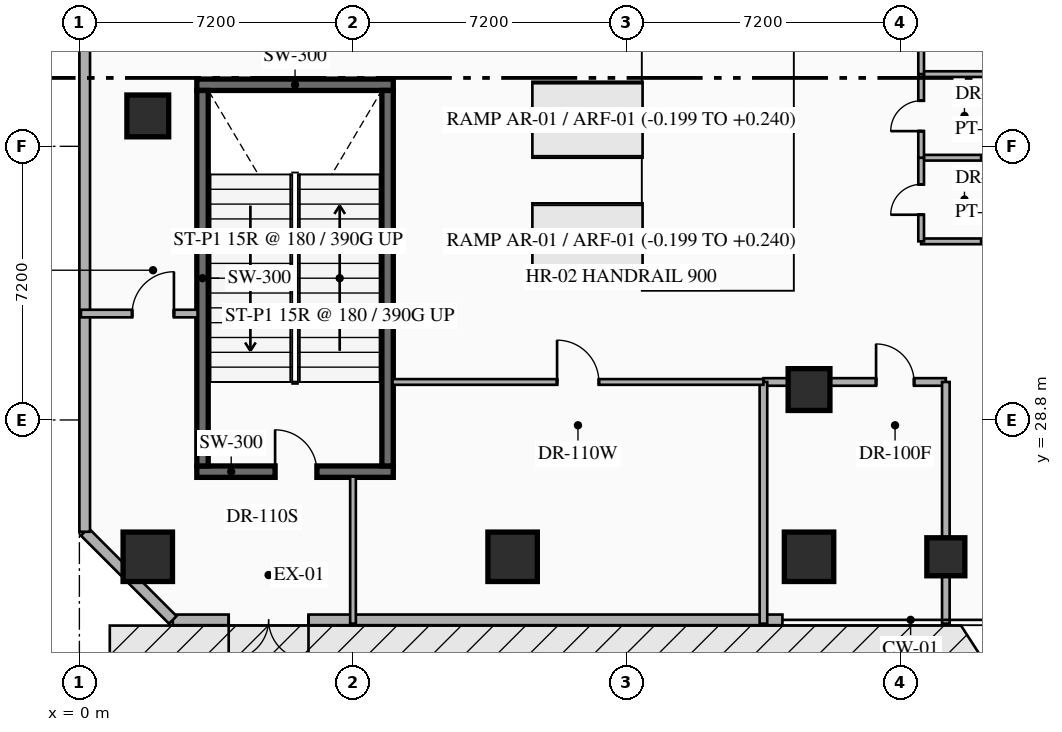
"""IFC4 building model, lengths in metres.
Left out: names, types, materials, properties, quantities, classifications, styles, units other than length and angle.
Written with IfcOpenShell. Run it as: python <this file> out.ifc"""

import sys

from ifc_helpers import new_model, si_unit, direction, frame, frame_2d, origin, origin_2d, place, context, subcontext, project, spatial, rectangle, hollow_rectangle, extrude, element, fill, save


model = new_model("IFC4")
c1 = context("Model", 3, precision=1e-05, world=origin(), true_north=direction((0.0, 1.0)))
c2 = subcontext(c1, "Body", "Model", "MODEL_VIEW")
j1 = project(units=[si_unit("LENGTHUNIT", "METRE"), si_unit("PLANEANGLEUNIT", "RADIAN")], contexts=[c1])
p1 = place(None, origin())
s1 = spatial("IfcSite", under=j1, at=p1, CompositionType="ELEMENT")
p2 = place(p1, origin())
s2 = spatial("IfcBuilding", under=s1, at=p2, CompositionType="ELEMENT")
p3 = place(p2, origin())
s3 = spatial("IfcBuildingStorey", under=s2, at=p3, CompositionType="ELEMENT", Elevation=0.0)
p4 = place(p3, frame((3.09, 27.44, 0.0), z_axis=(0.0, 0.0, 1.0), x_axis=(1.0, 0.0, 0.0)))
e1 = element("IfcWall", 1, at=p4, inside=s3, PredefinedType="SHEAR", context=c2, shape_type="SweptSolid", body=[
    extrude(rectangle(XDim=5.17, YDim=0.3, at=frame_2d((2.585, 0.0))), origin(), (0.0, 0.0, 1.0), 5.4),
])
p5 = place(p4, frame((2.06, 0.0, 0.0)))
e2 = element("IfcOpeningElement", 2, at=p5, cuts=e1, PredefinedType="OPENING", context=c2, shape_type="SweptSolid", body=[
    extrude(rectangle(XDim=1.1, YDim=2.2, at=frame_2d((0.55, 1.1))), frame((0.0, 0.16, 0.0), z_axis=(0.0, -1.0, 0.0), x_axis=(1.0, 0.0, 0.0)), (0.0, 0.0, 1.0), 0.32),
])
p6 = place(p3, frame((3.09, 37.62, 0.0), z_axis=(0.0, 0.0, 1.0), x_axis=(1.0, 0.0, 0.0)))
e3 = element("IfcWall", 3, at=p6, inside=s3, PredefinedType="SHEAR", context=c2, shape_type="SweptSolid", body=[
    extrude(rectangle(XDim=5.17, YDim=0.3, at=frame_2d((2.585, 0.0))), origin(), (0.0, 0.0, 1.0), 5.4),
])
for number, where, z_axis, x_axis in (
    (4, (3.24, 27.59, 0.0), (0.0, 0.0, 1.0), (0.0, 1.0, 0.0)),
    (5, (8.11, 27.59, 0.0), (0.0, 0.0, 1.0), (0.0, 1.0, 0.0)),
):
    element("IfcWall", number, at=place(p3, frame(where, z_axis=z_axis, x_axis=x_axis)), inside=s3, PredefinedType="SHEAR", context=c2, shape_type="SweptSolid", body=[
        extrude(rectangle(XDim=9.88, YDim=0.3, at=frame_2d((4.94, 0.0))), origin(), (0.0, 0.0, 1.0), 5.4),
    ])
p7 = place(p3, frame((1.8, 25.2, 0.0), z_axis=(0.0, 0.0, 1.0), x_axis=(1.0, 0.0, 0.0)))
e6 = element("IfcColumn", 6, at=p7, inside=s3, PredefinedType="COLUMN", context=c2, shape_type="SweptSolid", body=[
    extrude(rectangle(XDim=1.3, YDim=1.3, at=origin_2d()), origin(), (0.0, 0.0, 1.0), 5.4),
])
p8 = place(p3, frame((1.8, 36.8, 0.0), z_axis=(0.0, 0.0, 1.0), x_axis=(1.0, 0.0, 0.0)))
e7 = element("IfcColumn", 7, at=p8, inside=s3, PredefinedType="COLUMN", context=c2, shape_type="SweptSolid", body=[
    extrude(hollow_rectangle(XDim=1.1, YDim=1.1, WallThickness=0.04, at=origin_2d()), origin(), (0.0, 0.0, 1.0), 5.4),
])
for number, where, z_axis, x_axis in (
    (8, (11.4, 25.2, 0.0), (0.0, 0.0, 1.0), (1.0, 0.0, 0.0)),
    (9, (19.2, 25.2, 0.0), (0.0, 0.0, 1.0), (1.0, 0.0, 0.0)),
):
    element("IfcColumn", number, at=place(p3, frame(where, z_axis=z_axis, x_axis=x_axis)), inside=s3, PredefinedType="COLUMN", context=c2, shape_type="SweptSolid", body=[
        extrude(rectangle(XDim=1.3, YDim=1.3, at=origin_2d()), origin(), (0.0, 0.0, 1.0), 5.4),
    ])
p9 = place(p3, frame((19.2, 29.6, 0.0), z_axis=(0.0, 0.0, 1.0), x_axis=(1.0, 0.0, 0.0)))
e10 = element("IfcColumn", 10, at=p9, inside=s3, PredefinedType="COLUMN", context=c2, shape_type="SweptSolid", body=[
    extrude(hollow_rectangle(XDim=1.1, YDim=1.1, WallThickness=0.04, at=origin_2d()), origin(), (0.0, 0.0, 1.0), 5.4),
])
p10 = place(p3, frame((22.8, 25.2, 0.0), z_axis=(0.0, 0.0, 1.0), x_axis=(1.0, 0.0, 0.0)))
e11 = element("IfcColumn", 11, at=p10, inside=s3, PredefinedType="COLUMN", context=c2, shape_type="SweptSolid", body=[
    extrude(hollow_rectangle(XDim=1.0, YDim=1.0, WallThickness=0.038, at=origin_2d()), origin(), (0.0, 0.0, 1.0), 5.4),
])
p11 = place(p3, frame((18.5, 23.54, 0.0), z_axis=(0.0, 0.0, 1.0), x_axis=(-1.0, 0.0, 0.0)))
e12 = element("IfcWall", 12, at=p11, inside=s3, PredefinedType="STANDARD", context=c2, shape_type="SweptSolid", body=[
    extrude(rectangle(XDim=16.042, YDim=0.28, at=frame_2d((8.021, 0.0))), origin(), (0.0, 0.0, 1.0), 5.1),
])
p12 = place(p11, frame((12.471, 0.0, 0.0)))
e13 = element("IfcOpeningElement", 13, at=p12, cuts=e12, PredefinedType="OPENING", context=c2, shape_type="SweptSolid", body=[
    extrude(rectangle(XDim=2.1, YDim=2.3, at=frame_2d((1.05, 1.15))), frame((0.0, 0.15, 0.0), z_axis=(0.0, -1.0, 0.0), x_axis=(1.0, 0.0, 0.0)), (0.0, 0.0, 1.0), 0.3),
])
p13 = place(p3, frame((2.458, 23.54, 0.0), z_axis=(0.0, 0.0, 1.0), x_axis=(-0.707144017911, 0.707069542501, 0.0)))
e14 = element("IfcWall", 14, at=p13, inside=s3, PredefinedType="STANDARD", context=c2, shape_type="SweptSolid", body=[
    extrude(rectangle(XDim=3.278, YDim=0.28, at=frame_2d((1.639, 0.0))), origin(), (0.0, 0.0, 1.0), 5.1),
])
p14 = place(p3, frame((0.14, 25.858, 0.0), z_axis=(0.0, 0.0, 1.0), x_axis=(0.0, 1.0, 0.0)))
e15 = element("IfcWall", 15, at=p14, inside=s3, PredefinedType="STANDARD", context=c2, shape_type="SweptSolid", body=[
    extrude(rectangle(XDim=23.284, YDim=0.28, at=frame_2d((11.642, 0.0))), origin(), (0.0, 0.0, 1.0), 5.1),
])
p15 = place(p14, frame((17.792, 0.0, 0.0)))
e16 = element("IfcOpeningElement", 16, at=p15, cuts=e15, PredefinedType="OPENING", context=c2, shape_type="SweptSolid", body=[
    extrude(rectangle(XDim=3.4, YDim=2.6, at=frame_2d((1.7, 1.3))), frame((0.0, 0.15, 0.0), z_axis=(0.0, -1.0, 0.0), x_axis=(1.0, 0.0, 0.0)), (0.0, 0.0, 1.0), 0.3),
])
for number, where, z_axis, x_axis in (
    (17, (22.15, 33.5, 0.0), (0.0, 0.0, 1.0), (1.0, 0.0, 0.0)),
    (18, (22.15, 35.7, 0.0), (0.0, 0.0, 1.0), (1.0, 0.0, 0.0)),
    (19, (22.15, 37.9, 0.0), (0.0, 0.0, 1.0), (1.0, 0.0, 0.0)),
):
    element("IfcWall", number, at=place(p3, frame(where, z_axis=z_axis, x_axis=x_axis)), inside=s3, PredefinedType="PARTITIONING", context=c2, shape_type="SweptSolid", body=[
        extrude(rectangle(XDim=3.3, YDim=0.15, at=frame_2d((1.65, 0.0))), origin(), (0.0, 0.0, 1.0), 5.1),
    ])
p16 = place(p3, frame((22.15, 33.5, 0.0), z_axis=(0.0, 0.0, 1.0), x_axis=(0.0, 1.0, 0.0)))
e20 = element("IfcWall", 20, at=p16, inside=s3, PredefinedType="PARTITIONING", context=c2, shape_type="SweptSolid", body=[
    extrude(rectangle(XDim=2.2, YDim=0.15, at=frame_2d((1.1, 0.0))), origin(), (0.0, 0.0, 1.0), 5.1),
])
p17 = place(p16, frame((0.7, 0.0, 0.0)))
e21 = element("IfcOpeningElement", 21, at=p17, cuts=e20, PredefinedType="OPENING", context=c2, shape_type="SweptSolid", body=[
    extrude(rectangle(XDim=0.8, YDim=2.06, at=frame_2d((0.4, 1.03))), frame((0.0, 0.085, 0.0), z_axis=(0.0, -1.0, 0.0), x_axis=(1.0, 0.0, 0.0)), (0.0, 0.0, 1.0), 0.17),
])
p18 = place(p3, frame((22.15, 35.7, 0.0), z_axis=(0.0, 0.0, 1.0), x_axis=(0.0, 1.0, 0.0)))
e22 = element("IfcWall", 22, at=p18, inside=s3, PredefinedType="PARTITIONING", context=c2, shape_type="SweptSolid", body=[
    extrude(rectangle(XDim=2.2, YDim=0.15, at=frame_2d((1.1, 0.0))), origin(), (0.0, 0.0, 1.0), 5.1),
])
p19 = place(p18, frame((0.7, 0.0, 0.0)))
e23 = element("IfcOpeningElement", 23, at=p19, cuts=e22, PredefinedType="OPENING", context=c2, shape_type="SweptSolid", body=[
    extrude(rectangle(XDim=0.8, YDim=2.06, at=frame_2d((0.4, 1.03))), frame((0.0, 0.085, 0.0), z_axis=(0.0, -1.0, 0.0), x_axis=(1.0, 0.0, 0.0)), (0.0, 0.0, 1.0), 0.17),
])
p20 = place(p3, frame((22.15, 37.9, 0.0), z_axis=(0.0, 0.0, 1.0), x_axis=(0.0, 1.0, 0.0)))
e24 = element("IfcWall", 24, at=p20, inside=s3, PredefinedType="PARTITIONING", context=c2, shape_type="SweptSolid", body=[
    extrude(rectangle(XDim=2.2, YDim=0.15, at=frame_2d((1.1, 0.0))), origin(), (0.0, 0.0, 1.0), 5.1),
])
p21 = place(p20, frame((0.7, 0.0, 0.0)))
e25 = element("IfcOpeningElement", 25, at=p21, cuts=e24, PredefinedType="OPENING", context=c2, shape_type="SweptSolid", body=[
    extrude(rectangle(XDim=0.8, YDim=2.06, at=frame_2d((0.4, 1.03))), frame((0.0, 0.085, 0.0), z_axis=(0.0, -1.0, 0.0), x_axis=(1.0, 0.0, 0.0)), (0.0, 0.0, 1.0), 0.17),
])
p22 = place(p3, frame((18.0, 29.8, 0.0), z_axis=(0.0, 0.0, 1.0), x_axis=(1.0, 0.0, 0.0)))
e26 = element("IfcWall", 26, at=p22, inside=s3, PredefinedType="STANDARD", context=c2, shape_type="SweptSolid", body=[
    extrude(rectangle(XDim=4.8, YDim=0.2, at=frame_2d((2.4, 0.0))), origin(), (0.0, 0.0, 1.0), 5.1),
])
p23 = place(p22, frame((2.964, 0.0, 0.0)))
e27 = element("IfcOpeningElement", 27, at=p23, cuts=e26, PredefinedType="OPENING", context=c2, shape_type="SweptSolid", body=[
    extrude(rectangle(XDim=1.0, YDim=2.2, at=frame_2d((0.5, 1.1))), frame((0.0, 0.11, 0.0), z_axis=(0.0, -1.0, 0.0), x_axis=(1.0, 0.0, 0.0)), (0.0, 0.0, 1.0), 0.22),
])
p24 = place(p3, frame((18.0, 23.44, 0.0), z_axis=(0.0, 0.0, 1.0), x_axis=(0.0, 1.0, 0.0)))
e28 = element("IfcWall", 28, at=p24, inside=s3, PredefinedType="STANDARD", context=c2, shape_type="SweptSolid", body=[
    extrude(rectangle(XDim=6.36, YDim=0.2, at=frame_2d((3.18, 0.0))), origin(), (0.0, 0.0, 1.0), 5.1),
])
p25 = place(p3, frame((22.8, 23.44, 0.0), z_axis=(0.0, 0.0, 1.0), x_axis=(0.0, 1.0, 0.0)))
e29 = element("IfcWall", 29, at=p25, inside=s3, PredefinedType="STANDARD", context=c2, shape_type="SweptSolid", body=[
    extrude(rectangle(XDim=6.36, YDim=0.2, at=frame_2d((3.18, 0.0))), origin(), (0.0, 0.0, 1.0), 3.895),
])
p26 = place(p3, frame((8.24, 29.8, 0.0), z_axis=(0.0, 0.0, 1.0), x_axis=(1.0, 0.0, 0.0)))
e30 = element("IfcWall", 30, at=p26, inside=s3, PredefinedType="PARTITIONING", context=c2, shape_type="SweptSolid", body=[
    extrude(rectangle(XDim=9.76, YDim=0.15, at=frame_2d((4.88, 0.0))), origin(), (0.0, 0.0, 1.0), 5.1),
])
p27 = place(p26, frame((4.33, 0.0, 0.0)))
e31 = element("IfcOpeningElement", 31, at=p27, cuts=e30, PredefinedType="OPENING", context=c2, shape_type="SweptSolid", body=[
    extrude(rectangle(XDim=1.1, YDim=2.16, at=frame_2d((0.55, 1.08))), frame((0.0, 0.085, 0.0), z_axis=(0.0, -1.0, 0.0), x_axis=(1.0, 0.0, 0.0)), (0.0, 0.0, 1.0), 0.17),
])
p28 = place(p3, frame((7.2, 23.44, 0.0), z_axis=(0.0, 0.0, 1.0), x_axis=(0.0, 1.0, 0.0)))
e32 = element("IfcWall", 32, at=p28, inside=s3, PredefinedType="PARTITIONING", context=c2, shape_type="SweptSolid", body=[
    extrude(rectangle(XDim=3.87, YDim=0.15, at=frame_2d((1.935, 0.0))), origin(), (0.0, 0.0, 1.0), 5.1),
])
p29 = place(p3, frame((0.04, 31.6, 0.0), z_axis=(0.0, 0.0, 1.0), x_axis=(1.0, 0.0, 0.0)))
e33 = element("IfcWall", 33, at=p29, inside=s3, PredefinedType="STANDARD", context=c2, shape_type="SweptSolid", body=[
    extrude(rectangle(XDim=3.07, YDim=0.2, at=frame_2d((1.535, 0.0))), origin(), (0.0, 0.0, 1.0), 5.1),
])
p30 = place(p29, frame((1.348, 0.0, 0.0)))
e34 = element("IfcOpeningElement", 34, at=p30, cuts=e33, PredefinedType="OPENING", context=c2, shape_type="SweptSolid", body=[
    extrude(rectangle(XDim=1.1, YDim=2.24, at=frame_2d((0.55, 1.12))), frame((0.0, 0.11, 0.0), z_axis=(0.0, -1.0, 0.0), x_axis=(1.0, 0.0, 0.0)), (0.0, 0.0, 1.0), 0.22),
])
p31 = place(p12, origin())
e35 = element("IfcDoor", 35, at=p31, inside=s3, OperationType="DOUBLE_SWING_LEFT", PredefinedType="DOOR", context=c2, shape_type="SweptSolid", body=[
    extrude(rectangle(XDim=2.1, YDim=2.3, at=frame_2d((1.05, 1.15))), frame((0.0, 0.025, 0.0), z_axis=(0.0, -1.0, 0.0), x_axis=(1.0, 0.0, 0.0)), (0.0, 0.0, 1.0), 0.05),
])
fill(e13, e35)
p32 = place(p5, origin())
e36 = element("IfcDoor", 36, at=p32, inside=s3, OperationType="SINGLE_SWING_LEFT", PredefinedType="DOOR", context=c2, shape_type="SweptSolid", body=[
    extrude(rectangle(XDim=1.1, YDim=2.2, at=frame_2d((0.55, 1.1))), frame((0.0, 0.025, 0.0), z_axis=(0.0, -1.0, 0.0), x_axis=(1.0, 0.0, 0.0)), (0.0, 0.0, 1.0), 0.05),
])
fill(e2, e36)
p33 = place(p17, origin())
e37 = element("IfcDoor", 37, at=p33, inside=s3, OperationType="SINGLE_SWING_LEFT", PredefinedType="DOOR", context=c2, shape_type="SweptSolid", body=[
    extrude(rectangle(XDim=0.8, YDim=2.06, at=frame_2d((0.4, 1.03))), frame((0.0, 0.025, 0.0), z_axis=(0.0, -1.0, 0.0), x_axis=(1.0, 0.0, 0.0)), (0.0, 0.0, 1.0), 0.05),
])
fill(e21, e37)
p34 = place(p19, origin())
e38 = element("IfcDoor", 38, at=p34, inside=s3, OperationType="SINGLE_SWING_LEFT", PredefinedType="DOOR", context=c2, shape_type="SweptSolid", body=[
    extrude(rectangle(XDim=0.8, YDim=2.06, at=frame_2d((0.4, 1.03))), frame((0.0, 0.025, 0.0), z_axis=(0.0, -1.0, 0.0), x_axis=(1.0, 0.0, 0.0)), (0.0, 0.0, 1.0), 0.05),
])
fill(e23, e38)
p35 = place(p23, origin())
e39 = element("IfcDoor", 39, at=p35, inside=s3, OperationType="SINGLE_SWING_LEFT", PredefinedType="DOOR", context=c2, shape_type="SweptSolid", body=[
    extrude(rectangle(XDim=1.0, YDim=2.2, at=frame_2d((0.5, 1.1))), frame((0.0, 0.025, 0.0), z_axis=(0.0, -1.0, 0.0), x_axis=(1.0, 0.0, 0.0)), (0.0, 0.0, 1.0), 0.05),
])
fill(e27, e39)
p36 = place(p27, origin())
e40 = element("IfcDoor", 40, at=p36, inside=s3, OperationType="SINGLE_SWING_LEFT", PredefinedType="DOOR", context=c2, shape_type="SweptSolid", body=[
    extrude(rectangle(XDim=1.1, YDim=2.16, at=frame_2d((0.55, 1.08))), frame((0.0, 0.025, 0.0), z_axis=(0.0, -1.0, 0.0), x_axis=(1.0, 0.0, 0.0)), (0.0, 0.0, 1.0), 0.05),
])
fill(e31, e40)
p37 = place(p30, origin())
e41 = element("IfcDoor", 41, at=p37, inside=s3, OperationType="SINGLE_SWING_RIGHT", PredefinedType="DOOR", context=c2, shape_type="SweptSolid", body=[
    extrude(rectangle(XDim=1.1, YDim=2.24, at=frame_2d((0.55, 1.12))), frame((0.0, 0.025, 0.0), z_axis=(0.0, -1.0, 0.0), x_axis=(1.0, 0.0, 0.0)), (0.0, 0.0, 1.0), 0.05),
])
fill(e34, e41)
save(model, sys.argv[1])
